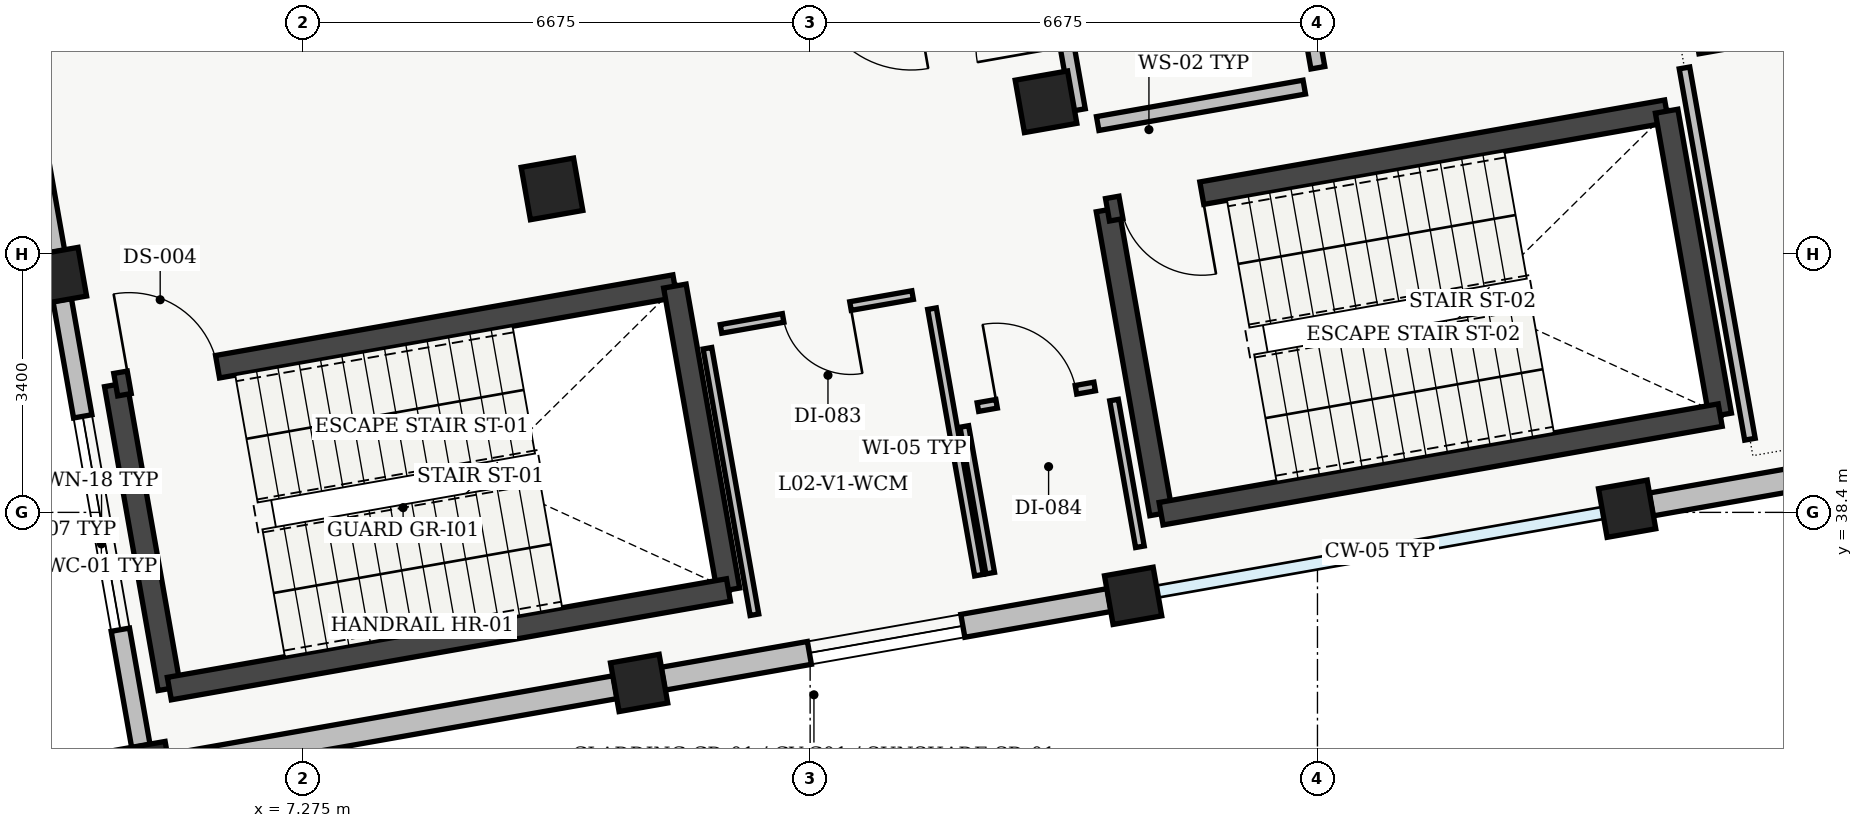
"""IFC4 building model, lengths in metres.
Left out: names, types, materials, properties, quantities, classifications, styles, units other than length and angle.
Written with IfcOpenShell. Run it as: python <this file> out.ifc"""

import sys

from ifc_helpers import new_model, si_unit, direction, frame, frame_2d, origin, origin_2d, place, context, subcontext, project, spatial, rectangle, extrude, element, fill, save


model = new_model("IFC4")
c1 = context("Model", 3, precision=1e-05, world=origin(), true_north=direction((0.0, 1.0)))
c2 = subcontext(c1, "Body", "Model", "MODEL_VIEW")
j1 = project(units=[si_unit("LENGTHUNIT", "METRE"), si_unit("PLANEANGLEUNIT", "RADIAN")], contexts=[c1])
p1 = place(None, origin())
s1 = spatial("IfcSite", under=j1, at=p1, CompositionType="ELEMENT")
p2 = place(p1, origin())
s2 = spatial("IfcBuilding", under=s1, at=p2, CompositionType="ELEMENT")
p3 = place(p2, frame((0.0, 0.0, 9.6)))
s3 = spatial("IfcBuildingStorey", under=s2, at=p3, CompositionType="ELEMENT", Elevation=9.6)
for number, where, z_axis, x_axis in (
    (1, (5.2, 35.01, 0.0), (0.0, 0.0, 1.0), (0.985, 0.174, 0.0)),
    (2, (4.054, 41.51, 0.0), (0.0, 0.0, 1.0), (0.985, 0.174, 0.0)),
    (3, (11.7, 36.156, 0.0), (0.0, 0.0, 1.0), (0.985, 0.174, 0.0)),
):
    element("IfcColumn", number, at=place(p3, frame(where, z_axis=z_axis, x_axis=x_axis)), inside=s3, PredefinedType="COLUMN", context=c2, shape_type="SweptSolid", body=[
        extrude(rectangle(XDim=0.65, YDim=0.65, at=origin_2d()), origin(), (0.0, 0.0, 1.0), 4.32),
    ])
p4 = place(p3, frame((10.554, 42.656, 0.0), z_axis=(0.0, 0.0, 1.0), x_axis=(0.984807753012, 0.173648177667, 0.0)))
e4 = element("IfcColumn", 4, at=p4, inside=s3, PredefinedType="COLUMN", context=c2, shape_type="SweptSolid", body=[
    extrude(rectangle(XDim=0.7, YDim=0.7, at=origin_2d()), origin(), (0.0, 0.0, 1.0), 4.32),
])
p5 = place(p3, frame((18.199, 37.302, 0.0), z_axis=(0.0, 0.0, 1.0), x_axis=(0.984807753012, 0.173648177667, 0.0)))
e5 = element("IfcColumn", 5, at=p5, inside=s3, PredefinedType="COLUMN", context=c2, shape_type="SweptSolid", body=[
    extrude(rectangle(XDim=0.65, YDim=0.65, at=origin_2d()), origin(), (0.0, 0.0, 1.0), 4.32),
])
p6 = place(p3, frame((17.053, 43.802, 0.0), z_axis=(0.0, 0.0, 1.0), x_axis=(0.984807753012, 0.173648177667, 0.0)))
e6 = element("IfcColumn", 6, at=p6, inside=s3, PredefinedType="COLUMN", context=c2, shape_type="SweptSolid", body=[
    extrude(rectangle(XDim=0.7, YDim=0.7, at=origin_2d()), origin(), (0.0, 0.0, 1.0), 4.32),
])
p7 = place(p3, frame((24.699, 38.448, 0.0), z_axis=(0.0, 0.0, 1.0), x_axis=(0.984807753012, 0.173648177667, 0.0)))
e7 = element("IfcColumn", 7, at=p7, inside=s3, PredefinedType="COLUMN", context=c2, shape_type="SweptSolid", body=[
    extrude(rectangle(XDim=0.65, YDim=0.65, at=origin_2d()), origin(), (0.0, 0.0, 1.0), 4.32),
])
p8 = place(p3, frame((5.145, 35.325, 0.0), z_axis=(0.0, 0.0, 1.0), x_axis=(-0.17368484894, 0.984801286173, 0.0)))
e8 = element("IfcWall", 8, at=p8, inside=s3, PredefinedType="STANDARD", context=c2, shape_type="SweptSolid", body=[
    extrude(rectangle(XDim=5.96, YDim=0.245, at=frame_2d((2.98, 0.0))), origin(), (0.0, 0.0, 1.0), 3.855),
])
p9 = place(p8, frame((1.555, 0.0, 0.95)))
e9 = element("IfcOpeningElement", 9, at=p9, cuts=e8, PredefinedType="OPENING", context=c2, shape_type="SweptSolid", body=[
    extrude(rectangle(XDim=2.85, YDim=1.5, at=frame_2d((1.425, 0.75))), frame((0.0, 0.123, 0.0), z_axis=(0.0, -1.0, 0.0), x_axis=(1.0, 0.0, 0.0)), (0.0, 0.0, 1.0), 0.245),
])
p10 = place(p3, frame((3.998, 41.825, 0.0), z_axis=(0.0, 0.0, 1.0), x_axis=(-0.173645120828, 0.98480829201, 0.0)))
e10 = element("IfcWall", 10, at=p10, inside=s3, PredefinedType="STANDARD", context=c2, shape_type="SweptSolid", body=[
    extrude(rectangle(XDim=5.96, YDim=0.29, at=frame_2d((2.98, 0.0))), origin(), (0.0, 0.0, 1.0), 3.855),
])
p11 = place(p10, frame((2.34, 0.0, 0.95)))
e11 = element("IfcOpeningElement", 11, at=p11, cuts=e10, PredefinedType="OPENING", context=c2, shape_type="SweptSolid", body=[
    extrude(rectangle(XDim=1.28, YDim=1.42, at=frame_2d((0.64, 0.71))), frame((0.0, 0.145, 0.0), z_axis=(0.0, -1.0, 0.0), x_axis=(1.0, 0.0, 0.0)), (0.0, 0.0, 1.0), 0.29),
])
p12 = place(p3, frame((30.884, 39.539, 0.0), z_axis=(0.0, 0.0, 1.0), x_axis=(-0.98480829201, -0.173645120828, 0.0)))
e12 = element("IfcWall", 12, at=p12, inside=s3, PredefinedType="STANDARD", context=c2, shape_type="SweptSolid", body=[
    extrude(rectangle(XDim=5.96, YDim=0.305, at=frame_2d((2.98, 0.0))), origin(), (0.0, 0.0, 1.0), 3.855),
])
p13 = place(p12, frame((2.34, 0.0, 0.95)))
e13 = element("IfcOpeningElement", 13, at=p13, cuts=e12, PredefinedType="OPENING", context=c2, shape_type="SweptSolid", body=[
    extrude(rectangle(XDim=1.28, YDim=1.4, at=frame_2d((0.64, 0.7))), frame((0.0, 0.152, 0.0), z_axis=(0.0, -1.0, 0.0), x_axis=(1.0, 0.0, 0.0)), (0.0, 0.0, 1.0), 0.305),
])
p14 = place(p3, frame((17.884, 37.247, 0.0), z_axis=(0.0, 0.0, 1.0), x_axis=(-0.98480829201, -0.173645120828, 0.0)))
e14 = element("IfcWall", 14, at=p14, inside=s3, PredefinedType="STANDARD", context=c2, shape_type="SweptSolid", body=[
    extrude(rectangle(XDim=5.96, YDim=0.305, at=frame_2d((2.98, 0.0))), origin(), (0.0, 0.0, 1.0), 3.855),
])
p15 = place(p14, frame((1.955, 0.0, 0.95)))
e15 = element("IfcOpeningElement", 15, at=p15, cuts=e14, PredefinedType="OPENING", context=c2, shape_type="SweptSolid", body=[
    extrude(rectangle(XDim=2.05, YDim=1.7, at=frame_2d((1.025, 0.85))), frame((0.0, 0.152, 0.0), z_axis=(0.0, -1.0, 0.0), x_axis=(1.0, 0.0, 0.0)), (0.0, 0.0, 1.0), 0.305),
])
p16 = place(p3, frame((11.385, 36.101, 0.0), z_axis=(0.0, 0.0, 1.0), x_axis=(-0.98480829201, -0.173645120828, 0.0)))
e16 = element("IfcWall", 16, at=p16, inside=s3, PredefinedType="STANDARD", context=c2, shape_type="SweptSolid", body=[
    extrude(rectangle(XDim=5.96, YDim=0.305, at=frame_2d((2.98, 0.0))), origin(), (0.0, 0.0, 1.0), 3.855),
])
p17 = place(p3, frame((5.519, 36.082, 0.0), z_axis=(0.0, 0.0, 1.0), x_axis=(-0.173665267602, 0.984804739443, 0.0)))
e17 = element("IfcWall", 17, at=p17, inside=s3, PredefinedType="SHEAR", context=c2, shape_type="SweptSolid", body=[
    extrude(rectangle(XDim=4.06, YDim=0.3, at=frame_2d((2.03, 0.0))), origin(), (0.0, 0.0, 1.0), 4.28),
])
p18 = place(p3, frame((4.814, 40.08, 0.0), z_axis=(0.0, 0.0, 1.0), x_axis=(0.984802636214, 0.173677193974, 0.0)))
e18 = element("IfcWall", 18, at=p18, inside=s3, PredefinedType="SHEAR", context=c2, shape_type="SweptSolid", body=[
    extrude(rectangle(XDim=7.47, YDim=0.3, at=frame_2d((3.735, 0.0))), origin(), (0.0, 0.0, 1.0), 4.28),
])
p19 = place(p18, frame((0.18, 0.0, 0.0)))
e19 = element("IfcOpeningElement", 19, at=p19, cuts=e18, PredefinedType="OPENING", context=c2, shape_type="SweptSolid", body=[
    extrude(rectangle(XDim=1.18, YDim=2.15, at=frame_2d((0.59, 1.075))), frame((0.0, 0.15, 0.0), z_axis=(0.0, -1.0, 0.0), x_axis=(1.0, 0.0, 0.0)), (0.0, 0.0, 1.0), 0.3),
])
p20 = place(p3, frame((12.17, 41.377, 0.0), z_axis=(0.0, 0.0, 1.0), x_axis=(0.173654983803, -0.984806552883, 0.0)))
e20 = element("IfcWall", 20, at=p20, inside=s3, PredefinedType="SHEAR", context=c2, shape_type="SweptSolid", body=[
    extrude(rectangle(XDim=4.06, YDim=0.3, at=frame_2d((2.03, 0.0))), origin(), (0.0, 0.0, 1.0), 4.28),
])
p21 = place(p3, frame((12.875, 37.379, 0.0), z_axis=(0.0, 0.0, 1.0), x_axis=(-0.984808225754, -0.173645496596, 0.0)))
e21 = element("IfcWall", 21, at=p21, inside=s3, PredefinedType="SHEAR", context=c2, shape_type="SweptSolid", body=[
    extrude(rectangle(XDim=7.47, YDim=0.3, at=frame_2d((3.735, 0.0))), origin(), (0.0, 0.0, 1.0), 4.28),
])
p22 = place(p3, frame((18.567, 38.383, 0.0), z_axis=(0.0, 0.0, 1.0), x_axis=(-0.173606946886, 0.984815022221, 0.0)))
e22 = element("IfcWall", 22, at=p22, inside=s3, PredefinedType="SHEAR", context=c2, shape_type="SweptSolid", body=[
    extrude(rectangle(XDim=4.06, YDim=0.3, at=frame_2d((2.03, 0.0))), origin(), (0.0, 0.0, 1.0), 4.28),
])
p23 = place(p3, frame((17.863, 42.381, 0.0), z_axis=(0.0, 0.0, 1.0), x_axis=(0.984808225754, 0.173645496596, 0.0)))
e23 = element("IfcWall", 23, at=p23, inside=s3, PredefinedType="SHEAR", context=c2, shape_type="SweptSolid", body=[
    extrude(rectangle(XDim=7.47, YDim=0.3, at=frame_2d((3.735, 0.0))), origin(), (0.0, 0.0, 1.0), 4.28),
])
p24 = place(p23, frame((0.18, 0.0, 0.0)))
e24 = element("IfcOpeningElement", 24, at=p24, cuts=e23, PredefinedType="OPENING", context=c2, shape_type="SweptSolid", body=[
    extrude(rectangle(XDim=1.08, YDim=2.15, at=frame_2d((0.54, 1.075))), frame((0.0, 0.15, 0.0), z_axis=(0.0, -1.0, 0.0), x_axis=(1.0, 0.0, 0.0)), (0.0, 0.0, 1.0), 0.3),
])
p25 = place(p3, frame((25.219, 43.678, 0.0), z_axis=(0.0, 0.0, 1.0), x_axis=(0.173665267602, -0.984804739443, 0.0)))
e25 = element("IfcWall", 25, at=p25, inside=s3, PredefinedType="SHEAR", context=c2, shape_type="SweptSolid", body=[
    extrude(rectangle(XDim=4.06, YDim=0.3, at=frame_2d((2.03, 0.0))), origin(), (0.0, 0.0, 1.0), 4.28),
])
p26 = place(p3, frame((25.924, 39.68, 0.0), z_axis=(0.0, 0.0, 1.0), x_axis=(-0.984809211193, -0.173639907711, 0.0)))
e26 = element("IfcWall", 26, at=p26, inside=s3, PredefinedType="SHEAR", context=c2, shape_type="SweptSolid", body=[
    extrude(rectangle(XDim=7.47, YDim=0.3, at=frame_2d((3.735, 0.0))), origin(), (0.0, 0.0, 1.0), 4.28),
])
p27 = place(p3, frame((17.733, 43.516, 0.0), z_axis=(0.0, 0.0, 1.0), x_axis=(0.984808483292, 0.173644035992, 0.0)))
e27 = element("IfcWall", 27, at=p27, inside=s3, PredefinedType="SOLIDWALL", context=c2, shape_type="SweptSolid", body=[
    extrude(rectangle(XDim=2.76, YDim=0.185, at=frame_2d((1.38, 0.0))), origin(), (0.0, 0.0, 1.0), 3.95),
])
p28 = place(p3, frame((20.63, 44.25, 0.0), z_axis=(0.0, 0.0, 1.0), x_axis=(-0.173621956536, 0.984812376145, 0.0)))
e28 = element("IfcWall", 28, at=p28, inside=s3, PredefinedType="SOLIDWALL", context=c2, shape_type="SweptSolid", body=[
    extrude(rectangle(XDim=3.41, YDim=0.185, at=frame_2d((1.705, 0.0))), origin(), (0.0, 0.0, 1.0), 3.95),
])
p29 = place(p28, frame((0.85, 0.0, 0.0)))
e29 = element("IfcOpeningElement", 29, at=p29, cuts=e28, PredefinedType="OPENING", context=c2, shape_type="SweptSolid", body=[
    extrude(rectangle(XDim=1.2, YDim=2.15, at=frame_2d((0.6, 1.075))), frame((0.0, 0.093, 0.0), z_axis=(0.0, -1.0, 0.0), x_axis=(1.0, 0.0, 0.0)), (0.0, 0.0, 1.0), 0.185),
])
p30 = place(p3, frame((16.886, 47.052, 0.0), z_axis=(0.0, 0.0, 1.0), x_axis=(0.173621956536, -0.984812376145, 0.0)))
e30 = element("IfcWall", 30, at=p30, inside=s3, PredefinedType="SOLIDWALL", context=c2, shape_type="SweptSolid", body=[
    extrude(rectangle(XDim=3.41, YDim=0.185, at=frame_2d((1.705, 0.0))), origin(), (0.0, 0.0, 1.0), 3.95),
])
p31 = place(p30, frame((1.36, 0.0, 0.0)))
e31 = element("IfcOpeningElement", 31, at=p31, cuts=e30, PredefinedType="OPENING", context=c2, shape_type="SweptSolid", body=[
    extrude(rectangle(XDim=1.2, YDim=2.15, at=frame_2d((0.6, 1.075))), frame((0.0, 0.093, 0.0), z_axis=(0.0, -1.0, 0.0), x_axis=(1.0, 0.0, 0.0)), (0.0, 0.0, 1.0), 0.185),
])
p32 = place(p3, frame((16.171, 37.574, 0.0), z_axis=(0.0, 0.0, 1.0), x_axis=(-0.173644490041, 0.984808403233, 0.0)))
e32 = element("IfcWall", 32, at=p32, inside=s3, PredefinedType="PARTITIONING", context=c2, shape_type="SweptSolid", body=[
    extrude(rectangle(XDim=3.56, YDim=0.115, at=frame_2d((1.78, 0.0))), origin(), (0.0, 0.0, 1.0), 3.95),
])
p33 = place(p3, frame((15.298, 41.259, 0.0), z_axis=(0.0, 0.0, 1.0), x_axis=(-0.984803714572, -0.17367107924, 0.0)))
e33 = element("IfcWall", 33, at=p33, inside=s3, PredefinedType="PARTITIONING", context=c2, shape_type="SweptSolid", body=[
    extrude(rectangle(XDim=2.56, YDim=0.115, at=frame_2d((1.28, 0.0))), origin(), (0.0, 0.0, 1.0), 3.95),
])
p34 = place(p33, frame((0.83, 0.0, 0.0)))
e34 = element("IfcOpeningElement", 34, at=p34, cuts=e33, PredefinedType="OPENING", context=c2, shape_type="SweptSolid", body=[
    extrude(rectangle(XDim=0.9, YDim=2.1, at=frame_2d((0.45, 1.05))), frame((0.0, 0.058, 0.0), z_axis=(0.0, -1.0, 0.0), x_axis=(1.0, 0.0, 0.0)), (0.0, 0.0, 1.0), 0.115),
])
p35 = place(p3, frame((12.599, 40.559, 0.0), z_axis=(0.0, 0.0, 1.0), x_axis=(0.173644490041, -0.984808403233, 0.0)))
e35 = element("IfcWall", 35, at=p35, inside=s3, PredefinedType="PARTITIONING", context=c2, shape_type="SweptSolid", body=[
    extrude(rectangle(XDim=3.56, YDim=0.115, at=frame_2d((1.78, 0.0))), origin(), (0.0, 0.0, 1.0), 3.95),
])
p36 = place(p3, frame((18.289, 37.948, 0.0), z_axis=(0.0, 0.0, 1.0), x_axis=(-0.173643211285, 0.984808628706, 0.0)))
e36 = element("IfcWall", 36, at=p36, inside=s3, PredefinedType="PARTITIONING", context=c2, shape_type="SweptSolid", body=[
    extrude(rectangle(XDim=1.96, YDim=0.115, at=frame_2d((0.98, 0.0))), origin(), (0.0, 0.0, 1.0), 3.655),
])
p37 = place(p3, frame((17.694, 40.056, 0.0), z_axis=(0.0, 0.0, 1.0), x_axis=(-0.984797734253, -0.173704987291, 0.0)))
e37 = element("IfcWall", 37, at=p37, inside=s3, PredefinedType="PARTITIONING", context=c2, shape_type="SweptSolid", body=[
    extrude(rectangle(XDim=1.56, YDim=0.115, at=frame_2d((0.78, 0.0))), origin(), (0.0, 0.0, 1.0), 3.95),
])
p38 = place(p37, frame((0.25, 0.0, 0.0)))
e38 = element("IfcOpeningElement", 38, at=p38, cuts=e37, PredefinedType="OPENING", context=c2, shape_type="SweptSolid", body=[
    extrude(rectangle(XDim=1.06, YDim=2.12, at=frame_2d((0.53, 1.06))), frame((0.0, 0.058, 0.0), z_axis=(0.0, -1.0, 0.0), x_axis=(1.0, 0.0, 0.0)), (0.0, 0.0, 1.0), 0.115),
])
p39 = place(p3, frame((15.979, 39.53, 0.0), z_axis=(0.0, 0.0, 1.0), x_axis=(0.173643211285, -0.984808628706, 0.0)))
e39 = element("IfcWall", 39, at=p39, inside=s3, PredefinedType="PARTITIONING", context=c2, shape_type="SweptSolid", body=[
    extrude(rectangle(XDim=1.96, YDim=0.115, at=frame_2d((0.98, 0.0))), origin(), (0.0, 0.0, 1.0), 3.95),
])
p40 = place(p3, frame((33.521, 45.893, 0.0), z_axis=(0.0, 0.0, 1.0), x_axis=(-0.984809322237, -0.173639277917, 0.0)))
e40 = element("IfcWall", 40, at=p40, inside=s3, PredefinedType="PARTITIONING", context=c2, shape_type="SweptSolid", body=[
    extrude(rectangle(XDim=8.01, YDim=0.14, at=frame_2d((4.005, 0.0))), origin(), (0.0, 0.0, 1.0), 3.95),
])
p41 = place(p40, frame((4.242, 0.0, 0.0)))
e41 = element("IfcOpeningElement", 41, at=p41, cuts=e40, PredefinedType="OPENING", context=c2, shape_type="SweptSolid", body=[
    extrude(rectangle(XDim=0.94, YDim=2.12, at=frame_2d((0.47, 1.06))), frame((0.0, 0.07, 0.0), z_axis=(0.0, -1.0, 0.0), x_axis=(1.0, 0.0, 0.0)), (0.0, 0.0, 1.0), 0.14),
])
p42 = place(p3, frame((25.454, 44.247, 0.0), z_axis=(0.0, 0.0, 1.0), x_axis=(0.173658971256, -0.98480584975, 0.0)))
e42 = element("IfcWall", 42, at=p42, inside=s3, PredefinedType="PARTITIONING", context=c2, shape_type="SweptSolid", body=[
    extrude(rectangle(XDim=4.96, YDim=0.14, at=frame_2d((2.48, 0.0))), origin(), (0.0, 0.0, 1.0), 3.95),
])
p43 = place(p9, origin())
e43 = element("IfcWindow", 43, at=p43, inside=s3, PartitioningType="SINGLE_PANEL", PredefinedType="WINDOW", context=c2, shape_type="SweptSolid", body=[
    extrude(rectangle(XDim=2.85, YDim=1.5, at=frame_2d((1.425, 0.75))), frame((0.0, 0.03, 0.0), z_axis=(0.0, -1.0, 0.0), x_axis=(1.0, 0.0, 0.0)), (0.0, 0.0, 1.0), 0.06),
])
fill(e9, e43)
p44 = place(p15, origin())
e44 = element("IfcWindow", 44, at=p44, inside=s3, PartitioningType="SINGLE_PANEL", PredefinedType="WINDOW", context=c2, shape_type="SweptSolid", body=[
    extrude(rectangle(XDim=2.05, YDim=1.7, at=frame_2d((1.025, 0.85))), frame((0.0, 0.03, 0.0), z_axis=(0.0, -1.0, 0.0), x_axis=(1.0, 0.0, 0.0)), (0.0, 0.0, 1.0), 0.06),
])
fill(e15, e44)
p45 = place(p19, origin())
e45 = element("IfcDoor", 45, at=p45, inside=s3, OperationType="SINGLE_SWING_LEFT", PredefinedType="DOOR", context=c2, shape_type="SweptSolid", body=[
    extrude(rectangle(XDim=1.18, YDim=2.15, at=frame_2d((0.59, 1.075))), frame((0.0, 0.025, 0.0), z_axis=(0.0, -1.0, 0.0), x_axis=(1.0, 0.0, 0.0)), (0.0, 0.0, 1.0), 0.05),
])
fill(e19, e45)
p46 = place(p24, origin())
e46 = element("IfcDoor", 46, at=p46, inside=s3, OperationType="SINGLE_SWING_RIGHT", PredefinedType="DOOR", context=c2, shape_type="SweptSolid", body=[
    extrude(rectangle(XDim=1.08, YDim=2.15, at=frame_2d((0.54, 1.075))), frame((0.0, 0.025, 0.0), z_axis=(0.0, -1.0, 0.0), x_axis=(1.0, 0.0, 0.0)), (0.0, 0.0, 1.0), 0.05),
])
fill(e24, e46)
p47 = place(p34, origin())
e47 = element("IfcDoor", 47, at=p47, inside=s3, OperationType="SINGLE_SWING_LEFT", PredefinedType="DOOR", context=c2, shape_type="SweptSolid", body=[
    extrude(rectangle(XDim=0.9, YDim=2.1, at=frame_2d((0.45, 1.05))), frame((0.0, 0.025, 0.0), z_axis=(0.0, -1.0, 0.0), x_axis=(1.0, 0.0, 0.0)), (0.0, 0.0, 1.0), 0.05),
])
fill(e34, e47)
p48 = place(p38, origin())
e48 = element("IfcDoor", 48, at=p48, inside=s3, OperationType="SINGLE_SWING_RIGHT", PredefinedType="DOOR", context=c2, shape_type="SweptSolid", body=[
    extrude(rectangle(XDim=1.06, YDim=2.12, at=frame_2d((0.53, 1.06))), frame((0.0, 0.025, 0.0), z_axis=(0.0, -1.0, 0.0), x_axis=(1.0, 0.0, 0.0)), (0.0, 0.0, 1.0), 0.05),
])
fill(e38, e48)
save(model, sys.argv[1])
